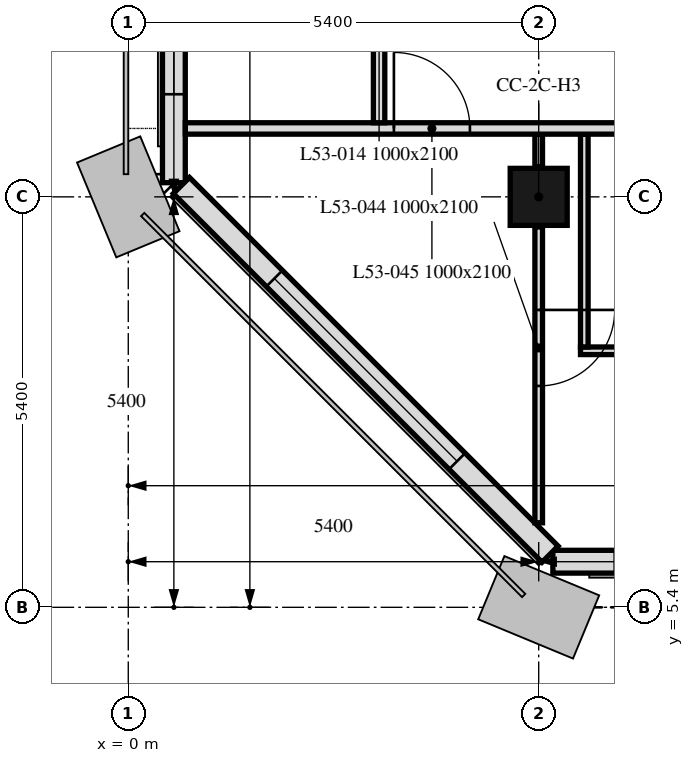
"""IFC4 building model, lengths in metres.
Left out: names, types, materials, properties, quantities, classifications, styles, units other than length and angle.
Written with IfcOpenShell. Run it as: python <this file> out.ifc"""

import sys

from ifc_helpers import new_model, si_unit, direction, frame, frame_2d, origin, origin_2d, place, context, subcontext, project, spatial, rectangle, extrude, element, fill, save


model = new_model("IFC4")
c1 = context("Model", 3, precision=1e-05, world=origin(), true_north=direction((0.0, 1.0)))
c2 = subcontext(c1, "Body", "Model", "MODEL_VIEW")
j1 = project(units=[si_unit("LENGTHUNIT", "METRE"), si_unit("PLANEANGLEUNIT", "RADIAN")], contexts=[c1])
p1 = place(None, origin())
s1 = spatial("IfcSite", under=j1, at=p1, CompositionType="ELEMENT")
p2 = place(p1, origin())
s2 = spatial("IfcBuilding", under=s1, at=p2, CompositionType="ELEMENT")
p3 = place(p2, frame((0.0, 0.0, 213.7)))
s3 = spatial("IfcBuildingStorey", under=s2, at=p3, CompositionType="ELEMENT", Elevation=213.7)
p4 = place(p3, frame((5.4, 10.8, 0.0), z_axis=(0.0, 0.0, 1.0), x_axis=(1.0, 0.0, 0.0)))
e1 = element("IfcColumn", 1, at=p4, inside=s3, PredefinedType="COLUMN", context=c2, shape_type="SweptSolid", body=[
    extrude(rectangle(XDim=0.75, YDim=0.75, at=origin_2d()), origin(), (0.0, 0.0, 1.0), 3.0),
])
p5 = place(p3, frame((5.586, 6.0, 0.0), z_axis=(0.0, 0.0, 1.0), x_axis=(1.0, 0.0, 0.0)))
e2 = element("IfcWall", 2, at=p5, inside=s3, PredefinedType="SOLIDWALL", context=c2, shape_type="SweptSolid", body=[
    extrude(rectangle(XDim=32.027, YDim=0.3, at=frame_2d((16.014, 0.0))), origin(), (0.0, 0.0, 1.0), 3.0),
])
p6 = place(p5, frame((0.814, 0.0, 0.9)))
e3 = element("IfcOpeningElement", 3, at=p6, cuts=e2, PredefinedType="OPENING", context=c2, shape_type="SweptSolid", body=[
    extrude(rectangle(XDim=3.4, YDim=1.7, at=frame_2d((1.7, 0.85))), frame((0.0, 0.16, 0.0), z_axis=(0.0, -1.0, 0.0), x_axis=(1.0, 0.0, 0.0)), (0.0, 0.0, 1.0), 0.32),
])
p7 = place(p5, frame((6.564, 0.0, 0.9)))
e4 = element("IfcOpeningElement", 4, at=p7, cuts=e2, PredefinedType="OPENING", context=c2, shape_type="SweptSolid", body=[
    extrude(rectangle(XDim=1.1, YDim=1.7, at=frame_2d((0.55, 0.85))), frame((0.0, 0.16, 0.0), z_axis=(0.0, -1.0, 0.0), x_axis=(1.0, 0.0, 0.0)), (0.0, 0.0, 1.0), 0.32),
])
p8 = place(p5, frame((11.614, 0.0, 0.9)))
e5 = element("IfcOpeningElement", 5, at=p8, cuts=e2, PredefinedType="OPENING", context=c2, shape_type="SweptSolid", body=[
    extrude(rectangle(XDim=3.4, YDim=1.7, at=frame_2d((1.7, 0.85))), frame((0.0, 0.16, 0.0), z_axis=(0.0, -1.0, 0.0), x_axis=(1.0, 0.0, 0.0)), (0.0, 0.0, 1.0), 0.32),
])
p9 = place(p5, frame((17.364, 0.0, 0.9)))
e6 = element("IfcOpeningElement", 6, at=p9, cuts=e2, PredefinedType="OPENING", context=c2, shape_type="SweptSolid", body=[
    extrude(rectangle(XDim=1.1, YDim=1.7, at=frame_2d((0.55, 0.85))), frame((0.0, 0.16, 0.0), z_axis=(0.0, -1.0, 0.0), x_axis=(1.0, 0.0, 0.0)), (0.0, 0.0, 1.0), 0.32),
])
p10 = place(p5, frame((22.414, 0.0, 0.9)))
e7 = element("IfcOpeningElement", 7, at=p10, cuts=e2, PredefinedType="OPENING", context=c2, shape_type="SweptSolid", body=[
    extrude(rectangle(XDim=3.4, YDim=1.7, at=frame_2d((1.7, 0.85))), frame((0.0, 0.16, 0.0), z_axis=(0.0, -1.0, 0.0), x_axis=(1.0, 0.0, 0.0)), (0.0, 0.0, 1.0), 0.32),
])
p11 = place(p5, frame((28.164, 0.0, 0.9)))
e8 = element("IfcOpeningElement", 8, at=p11, cuts=e2, PredefinedType="OPENING", context=c2, shape_type="SweptSolid", body=[
    extrude(rectangle(XDim=1.1, YDim=1.7, at=frame_2d((0.55, 0.85))), frame((0.0, 0.16, 0.0), z_axis=(0.0, -1.0, 0.0), x_axis=(1.0, 0.0, 0.0)), (0.0, 0.0, 1.0), 0.32),
])
p12 = place(p3, frame((0.6, 43.014, 0.0), z_axis=(0.0, 0.0, 1.0), x_axis=(0.0, -1.0, 0.0)))
e9 = element("IfcWall", 9, at=p12, inside=s3, PredefinedType="SOLIDWALL", context=c2, shape_type="SweptSolid", body=[
    extrude(rectangle(XDim=32.027, YDim=0.3, at=frame_2d((16.014, 0.0))), origin(), (0.0, 0.0, 1.0), 3.0),
])
p13 = place(p12, frame((1.164, 0.0, 0.9)))
e10 = element("IfcOpeningElement", 10, at=p13, cuts=e9, PredefinedType="OPENING", context=c2, shape_type="SweptSolid", body=[
    extrude(rectangle(XDim=1.1, YDim=1.7, at=frame_2d((0.55, 0.85))), frame((0.0, 0.16, 0.0), z_axis=(0.0, -1.0, 0.0), x_axis=(1.0, 0.0, 0.0)), (0.0, 0.0, 1.0), 0.32),
])
p14 = place(p12, frame((3.139, 0.0, 0.9)))
e11 = element("IfcOpeningElement", 11, at=p14, cuts=e9, PredefinedType="OPENING", context=c2, shape_type="SweptSolid", body=[
    extrude(rectangle(XDim=0.65, YDim=1.7, at=frame_2d((0.325, 0.85))), frame((0.0, 0.16, 0.0), z_axis=(0.0, -1.0, 0.0), x_axis=(1.0, 0.0, 0.0)), (0.0, 0.0, 1.0), 0.32),
])
p15 = place(p12, frame((6.564, 0.0, 0.9)))
e12 = element("IfcOpeningElement", 12, at=p15, cuts=e9, PredefinedType="OPENING", context=c2, shape_type="SweptSolid", body=[
    extrude(rectangle(XDim=1.1, YDim=1.7, at=frame_2d((0.55, 0.85))), frame((0.0, 0.16, 0.0), z_axis=(0.0, -1.0, 0.0), x_axis=(1.0, 0.0, 0.0)), (0.0, 0.0, 1.0), 0.32),
])
p16 = place(p12, frame((8.164, 0.0, 0.9)))
e13 = element("IfcOpeningElement", 13, at=p16, cuts=e9, PredefinedType="OPENING", context=c2, shape_type="SweptSolid", body=[
    extrude(rectangle(XDim=1.1, YDim=1.7, at=frame_2d((0.55, 0.85))), frame((0.0, 0.16, 0.0), z_axis=(0.0, -1.0, 0.0), x_axis=(1.0, 0.0, 0.0)), (0.0, 0.0, 1.0), 0.32),
])
p17 = place(p12, frame((11.614, 0.0, 0.9)))
e14 = element("IfcOpeningElement", 14, at=p17, cuts=e9, PredefinedType="OPENING", context=c2, shape_type="SweptSolid", body=[
    extrude(rectangle(XDim=3.4, YDim=1.7, at=frame_2d((1.7, 0.85))), frame((0.0, 0.16, 0.0), z_axis=(0.0, -1.0, 0.0), x_axis=(1.0, 0.0, 0.0)), (0.0, 0.0, 1.0), 0.32),
])
p18 = place(p12, frame((17.364, 0.0, 0.9)))
e15 = element("IfcOpeningElement", 15, at=p18, cuts=e9, PredefinedType="OPENING", context=c2, shape_type="SweptSolid", body=[
    extrude(rectangle(XDim=1.1, YDim=1.7, at=frame_2d((0.55, 0.85))), frame((0.0, 0.16, 0.0), z_axis=(0.0, -1.0, 0.0), x_axis=(1.0, 0.0, 0.0)), (0.0, 0.0, 1.0), 0.32),
])
p19 = place(p12, frame((18.964, 0.0, 0.9)))
e16 = element("IfcOpeningElement", 16, at=p19, cuts=e9, PredefinedType="OPENING", context=c2, shape_type="SweptSolid", body=[
    extrude(rectangle(XDim=1.1, YDim=1.7, at=frame_2d((0.55, 0.85))), frame((0.0, 0.16, 0.0), z_axis=(0.0, -1.0, 0.0), x_axis=(1.0, 0.0, 0.0)), (0.0, 0.0, 1.0), 0.32),
])
p20 = place(p12, frame((22.414, 0.0, 0.9)))
e17 = element("IfcOpeningElement", 17, at=p20, cuts=e9, PredefinedType="OPENING", context=c2, shape_type="SweptSolid", body=[
    extrude(rectangle(XDim=3.4, YDim=1.7, at=frame_2d((1.7, 0.85))), frame((0.0, 0.16, 0.0), z_axis=(0.0, -1.0, 0.0), x_axis=(1.0, 0.0, 0.0)), (0.0, 0.0, 1.0), 0.32),
])
p21 = place(p12, frame((28.164, 0.0, 0.9)))
e18 = element("IfcOpeningElement", 18, at=p21, cuts=e9, PredefinedType="OPENING", context=c2, shape_type="SweptSolid", body=[
    extrude(rectangle(XDim=1.1, YDim=1.7, at=frame_2d((0.55, 0.85))), frame((0.0, 0.16, 0.0), z_axis=(0.0, -1.0, 0.0), x_axis=(1.0, 0.0, 0.0)), (0.0, 0.0, 1.0), 0.32),
])
p22 = place(p12, frame((29.764, 0.0, 0.9)))
e19 = element("IfcOpeningElement", 19, at=p22, cuts=e9, PredefinedType="OPENING", context=c2, shape_type="SweptSolid", body=[
    extrude(rectangle(XDim=1.1, YDim=1.7, at=frame_2d((0.55, 0.85))), frame((0.0, 0.16, 0.0), z_axis=(0.0, -1.0, 0.0), x_axis=(1.0, 0.0, 0.0)), (0.0, 0.0, 1.0), 0.32),
])
p23 = place(p3, frame((0.699, 10.949, 0.0), z_axis=(0.0, 0.0, 1.0), x_axis=(0.707106781187, -0.707106781187, 0.0)))
e20 = element("IfcWall", 20, at=p23, inside=s3, PredefinedType="SOLIDWALL", context=c2, shape_type="SweptSolid", body=[
    extrude(rectangle(XDim=6.86, YDim=0.3, at=frame_2d((3.43, 0.0))), origin(), (0.0, 0.0, 1.0), 3.0),
])
p24 = place(p23, frame((1.73, 0.0, 0.9)))
e21 = element("IfcOpeningElement", 21, at=p24, cuts=e20, PredefinedType="OPENING", context=c2, shape_type="SweptSolid", body=[
    extrude(rectangle(XDim=3.4, YDim=1.7, at=frame_2d((1.7, 0.85))), frame((0.0, 0.16, 0.0), z_axis=(0.0, -1.0, 0.0), x_axis=(1.0, 0.0, 0.0)), (0.0, 0.0, 1.0), 0.32),
])
p25 = place(p3, frame((8.35, 8.775, 0.0), z_axis=(0.0, 0.0, 1.0), x_axis=(-1.0, 0.0, 0.0)))
e22 = element("IfcWall", 22, at=p25, inside=s3, PredefinedType="PARTITIONING", context=c2, shape_type="SweptSolid", body=[
    extrude(rectangle(XDim=2.4, YDim=0.1, at=frame_2d((1.2, 0.0))), origin(), (0.0, 0.0, 1.0), 3.0),
])
p26 = place(p3, frame((6.0, 8.825, 0.0), z_axis=(0.0, 0.0, 1.0), x_axis=(0.0, 1.0, 0.0)))
e23 = element("IfcWall", 23, at=p26, inside=s3, PredefinedType="PARTITIONING", context=c2, shape_type="SweptSolid", body=[
    extrude(rectangle(XDim=2.8, YDim=0.1, at=frame_2d((1.4, 0.0))), origin(), (0.0, 0.0, 1.0), 3.0),
])
p27 = place(p3, frame((5.4, 11.625, 0.0), z_axis=(0.0, 0.0, 1.0), x_axis=(0.0, -1.0, 0.0)))
e24 = element("IfcWall", 24, at=p27, inside=s3, PredefinedType="PARTITIONING", context=c2, shape_type="SweptSolid", body=[
    extrude(rectangle(XDim=0.43, YDim=0.1, at=frame_2d((0.215, 0.0))), origin(), (0.0, 0.0, 1.0), 3.0),
])
p28 = place(p3, frame((5.4, 10.405, 0.0), z_axis=(0.0, 0.0, 1.0), x_axis=(0.0, -1.0, 0.0)))
e25 = element("IfcWall", 25, at=p28, inside=s3, PredefinedType="PARTITIONING", context=c2, shape_type="SweptSolid", body=[
    extrude(rectangle(XDim=3.893, YDim=0.1, at=frame_2d((1.946, 0.0))), origin(), (0.0, 0.0, 1.0), 3.0),
])
p29 = place(p28, frame((1.093, 0.0, 0.0)))
e26 = element("IfcOpeningElement", 26, at=p29, cuts=e25, PredefinedType="OPENING", context=c2, shape_type="SweptSolid", body=[
    extrude(rectangle(XDim=1.0, YDim=2.1, at=frame_2d((0.5, 1.05))), frame((0.0, 0.05, 0.0), z_axis=(0.0, -1.0, 0.0), x_axis=(1.0, 0.0, 0.0)), (0.0, 0.0, 1.0), 0.1),
])
p30 = place(p3, frame((0.751, 11.7, 0.0), z_axis=(0.0, 0.0, 1.0), x_axis=(1.0, 0.0, 0.0)))
e27 = element("IfcWall", 27, at=p30, inside=s3, PredefinedType="PARTITIONING", context=c2, shape_type="SweptSolid", body=[
    extrude(rectangle(XDim=41.698, YDim=0.15, at=frame_2d((20.849, 0.0))), origin(), (0.0, 0.0, 1.0), 3.0),
])
p31 = place(p30, frame((39.249, 0.0, 0.0)))
e28 = element("IfcOpeningElement", 28, at=p31, cuts=e27, PredefinedType="OPENING", context=c2, shape_type="SweptSolid", body=[
    extrude(rectangle(XDim=1.0, YDim=2.1, at=frame_2d((0.5, 1.05))), frame((0.0, 0.075, 0.0), z_axis=(0.0, -1.0, 0.0), x_axis=(1.0, 0.0, 0.0)), (0.0, 0.0, 1.0), 0.15),
])
p32 = place(p30, frame((27.649, 0.0, 0.0)))
e29 = element("IfcOpeningElement", 29, at=p32, cuts=e27, PredefinedType="OPENING", context=c2, shape_type="SweptSolid", body=[
    extrude(rectangle(XDim=1.0, YDim=2.1, at=frame_2d((0.5, 1.05))), frame((0.0, 0.075, 0.0), z_axis=(0.0, -1.0, 0.0), x_axis=(1.0, 0.0, 0.0)), (0.0, 0.0, 1.0), 0.15),
])
p33 = place(p30, frame((22.249, 0.0, 0.0)))
e30 = element("IfcOpeningElement", 30, at=p33, cuts=e27, PredefinedType="OPENING", context=c2, shape_type="SweptSolid", body=[
    extrude(rectangle(XDim=1.0, YDim=2.1, at=frame_2d((0.5, 1.05))), frame((0.0, 0.075, 0.0), z_axis=(0.0, -1.0, 0.0), x_axis=(1.0, 0.0, 0.0)), (0.0, 0.0, 1.0), 0.15),
])
p34 = place(p30, frame((16.849, 0.0, 0.0)))
e31 = element("IfcOpeningElement", 31, at=p34, cuts=e27, PredefinedType="OPENING", context=c2, shape_type="SweptSolid", body=[
    extrude(rectangle(XDim=1.0, YDim=2.1, at=frame_2d((0.5, 1.05))), frame((0.0, 0.075, 0.0), z_axis=(0.0, -1.0, 0.0), x_axis=(1.0, 0.0, 0.0)), (0.0, 0.0, 1.0), 0.15),
])
p35 = place(p30, frame((11.449, 0.0, 0.0)))
e32 = element("IfcOpeningElement", 32, at=p35, cuts=e27, PredefinedType="OPENING", context=c2, shape_type="SweptSolid", body=[
    extrude(rectangle(XDim=1.0, YDim=2.1, at=frame_2d((0.5, 1.05))), frame((0.0, 0.075, 0.0), z_axis=(0.0, -1.0, 0.0), x_axis=(1.0, 0.0, 0.0)), (0.0, 0.0, 1.0), 0.15),
])
p36 = place(p30, frame((2.744, 0.0, 0.0)))
e33 = element("IfcOpeningElement", 33, at=p36, cuts=e27, PredefinedType="OPENING", context=c2, shape_type="SweptSolid", body=[
    extrude(rectangle(XDim=1.0, YDim=2.1, at=frame_2d((0.5, 1.05))), frame((0.0, 0.075, 0.0), z_axis=(0.0, -1.0, 0.0), x_axis=(1.0, 0.0, 0.0)), (0.0, 0.0, 1.0), 0.15),
])
p37 = place(p3, frame((3.3, 11.775, 0.0), z_axis=(0.0, 0.0, 1.0), x_axis=(0.0, 1.0, 0.0)))
e34 = element("IfcWall", 34, at=p37, inside=s3, PredefinedType="PARTITIONING", context=c2, shape_type="SweptSolid", body=[
    extrude(rectangle(XDim=28.2, YDim=0.15, at=frame_2d((14.1, 0.0))), origin(), (0.0, 0.0, 1.0), 2.4),
])
p38 = place(p37, frame((17.425, 0.0, 0.0)))
e35 = element("IfcOpeningElement", 35, at=p38, cuts=e34, PredefinedType="OPENING", context=c2, shape_type="SweptSolid", body=[
    extrude(rectangle(XDim=1.0, YDim=2.1, at=frame_2d((0.5, 1.05))), frame((0.0, 0.075, 0.0), z_axis=(0.0, -1.0, 0.0), x_axis=(1.0, 0.0, 0.0)), (0.0, 0.0, 1.0), 0.15),
])
p39 = place(p37, frame((1.675, 0.0, 0.0)))
e36 = element("IfcOpeningElement", 36, at=p39, cuts=e34, PredefinedType="OPENING", context=c2, shape_type="SweptSolid", body=[
    extrude(rectangle(XDim=1.0, YDim=2.1, at=frame_2d((0.5, 1.05))), frame((0.0, 0.075, 0.0), z_axis=(0.0, -1.0, 0.0), x_axis=(1.0, 0.0, 0.0)), (0.0, 0.0, 1.0), 0.15),
])
p40 = place(p37, frame((22.6, 0.0, 0.0)))
e37 = element("IfcOpeningElement", 37, at=p40, cuts=e34, PredefinedType="OPENING", context=c2, shape_type="SweptSolid", body=[
    extrude(rectangle(XDim=1.0, YDim=2.1, at=frame_2d((0.5, 1.05))), frame((0.0, 0.075, 0.0), z_axis=(0.0, -1.0, 0.0), x_axis=(1.0, 0.0, 0.0)), (0.0, 0.0, 1.0), 0.15),
])
p41 = place(p37, frame((7.975, 0.0, 0.0)))
e38 = element("IfcOpeningElement", 38, at=p41, cuts=e34, PredefinedType="OPENING", context=c2, shape_type="SweptSolid", body=[
    extrude(rectangle(XDim=1.0, YDim=2.1, at=frame_2d((0.5, 1.05))), frame((0.0, 0.075, 0.0), z_axis=(0.0, -1.0, 0.0), x_axis=(1.0, 0.0, 0.0)), (0.0, 0.0, 1.0), 0.15),
])
p42 = place(p22, origin())
e39 = element("IfcWindow", 39, at=p42, inside=s3, PartitioningType="SINGLE_PANEL", PredefinedType="WINDOW", context=c2, shape_type="SweptSolid", body=[
    extrude(rectangle(XDim=1.1, YDim=1.7, at=frame_2d((0.55, 0.85))), frame((0.0, 0.03, 0.0), z_axis=(0.0, -1.0, 0.0), x_axis=(1.0, 0.0, 0.0)), (0.0, 0.0, 1.0), 0.06),
])
fill(e19, e39)
p43 = place(p24, origin())
e40 = element("IfcWindow", 40, at=p43, inside=s3, PartitioningType="SINGLE_PANEL", PredefinedType="WINDOW", context=c2, shape_type="SweptSolid", body=[
    extrude(rectangle(XDim=3.4, YDim=1.7, at=frame_2d((1.7, 0.85))), frame((0.0, 0.03, 0.0), z_axis=(0.0, -1.0, 0.0), x_axis=(1.0, 0.0, 0.0)), (0.0, 0.0, 1.0), 0.06),
])
fill(e21, e40)
p44 = place(p29, origin())
e41 = element("IfcDoor", 41, at=p44, inside=s3, OperationType="SINGLE_SWING_RIGHT", PredefinedType="DOOR", context=c2, shape_type="SweptSolid", body=[
    extrude(rectangle(XDim=1.0, YDim=2.1, at=frame_2d((0.5, 1.05))), frame((0.0, 0.025, 0.0), z_axis=(0.0, -1.0, 0.0), x_axis=(1.0, 0.0, 0.0)), (0.0, 0.0, 1.0), 0.05),
])
fill(e26, e41)
p45 = place(p36, origin())
e42 = element("IfcDoor", 42, at=p45, inside=s3, OperationType="SINGLE_SWING_RIGHT", PredefinedType="DOOR", context=c2, shape_type="SweptSolid", body=[
    extrude(rectangle(XDim=1.0, YDim=2.1, at=frame_2d((0.5, 1.05))), frame((0.0, 0.025, 0.0), z_axis=(0.0, -1.0, 0.0), x_axis=(1.0, 0.0, 0.0)), (0.0, 0.0, 1.0), 0.05),
])
fill(e33, e42)
save(model, sys.argv[1])
